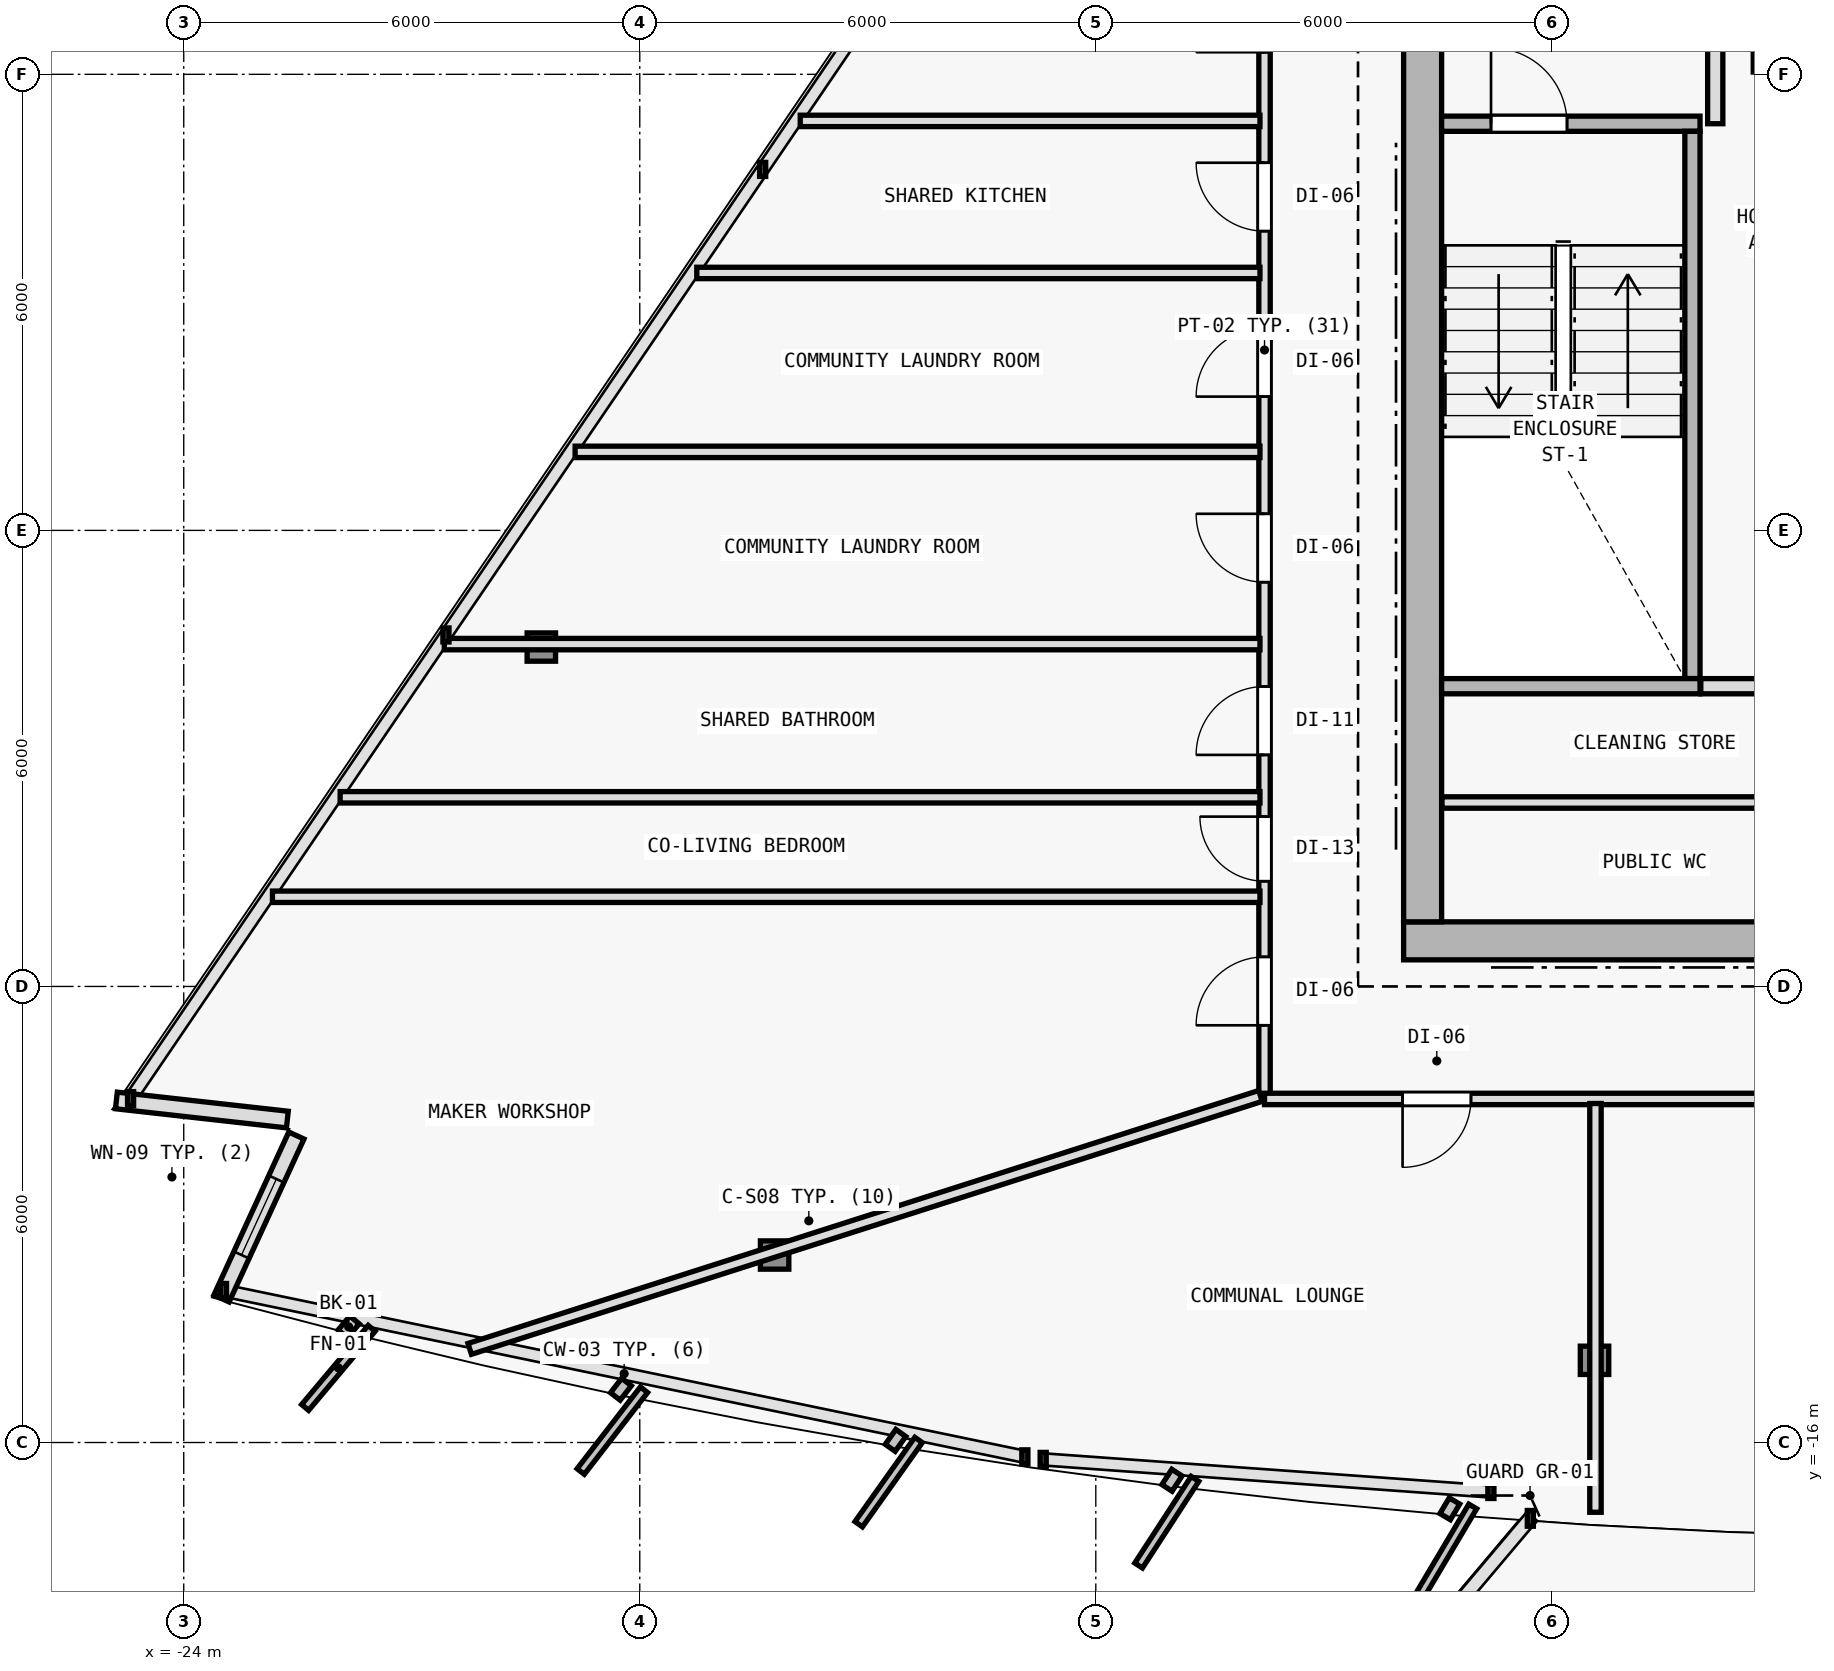
"""IFC4 building model, lengths in metres.
Left out: names, types, materials, properties, quantities, classifications, styles, units other than length and angle.
Written with IfcOpenShell. Run it as: python <this file> out.ifc"""

import sys

from ifc_helpers import new_model, si_unit, direction, frame, frame_2d, origin, origin_2d, place, context, subcontext, project, spatial, rectangle, i_section, extrude, element, fill, save


model = new_model("IFC4")
c1 = context("Model", 3, precision=1e-05, world=origin(), true_north=direction((0.0, 1.0)))
c2 = subcontext(c1, "Body", "Model", "MODEL_VIEW")
j1 = project(units=[si_unit("LENGTHUNIT", "METRE"), si_unit("PLANEANGLEUNIT", "RADIAN")], contexts=[c1])
p1 = place(None, origin())
s1 = spatial("IfcSite", under=j1, at=p1, CompositionType="ELEMENT")
p2 = place(p1, origin())
s2 = spatial("IfcBuilding", under=s1, at=p2, CompositionType="ELEMENT")
p3 = place(p2, frame((0.0, 0.0, 234.3)))
s3 = spatial("IfcBuildingStorey", under=s2, at=p3, CompositionType="ELEMENT", Elevation=234.3)
for number, where, z_axis, x_axis in (
    (1, (-7.7, -9.4, 0.0), (0.0, 0.0, 1.0), (1.0, 0.0, 0.0)),
    (2, (-7.7, 2.0, 0.0), (0.0, 0.0, 1.0), (1.0, 0.0, 0.0)),
):
    element("IfcColumn", number, at=place(p3, frame(where, z_axis=z_axis, x_axis=x_axis)), inside=s3, PredefinedType="COLUMN", context=c2, shape_type="SweptSolid", body=[
        extrude(i_section(OverallWidth=0.398, OverallDepth=0.387, WebThickness=0.013, FlangeThickness=0.022, FilletRadius=0.015, at=origin_2d()), origin(), (0.0, 0.0, 1.0), 3.6),
    ])
p4 = place(p3, frame((-16.226, -13.533, 0.005), z_axis=(0.020594893987, 0.033509183946, 0.999226193078), x_axis=(-0.851954850327, 0.523615252838, 0.0)))
e3 = element("IfcColumn", 3, at=p4, inside=s3, PredefinedType="COLUMN", context=c2, shape_type="SweptSolid", body=[
    extrude(i_section(OverallWidth=0.374, OverallDepth=0.372, WebThickness=0.012, FlangeThickness=0.02, FilletRadius=0.015, at=origin_2d()), origin(), (0.0, 0.0, 1.0), 3.592),
])
p5 = place(p3, frame((-5.438, -14.918, 0.005), z_axis=(0.006865841702, 0.035280909339, 0.999353850072), x_axis=(-0.981585848295, 0.191021523464, 0.0)))
e4 = element("IfcColumn", 4, at=p5, inside=s3, PredefinedType="COLUMN", context=c2, shape_type="SweptSolid", body=[
    extrude(i_section(OverallWidth=0.374, OverallDepth=0.372, WebThickness=0.012, FlangeThickness=0.02, FilletRadius=0.015, at=origin_2d()), origin(), (0.0, 0.0, 1.0), 3.592),
])
p6 = place(p3, frame((-19.295, -5.535, 0.005), z_axis=(0.025222449659, 0.021619242565, 0.999448065876), x_axis=(-0.650791373456, 0.759256602365, 0.0)))
e5 = element("IfcColumn", 5, at=p6, inside=s3, PredefinedType="COLUMN", context=c2, shape_type="SweptSolid", body=[
    extrude(i_section(OverallWidth=0.374, OverallDepth=0.372, WebThickness=0.012, FlangeThickness=0.02, FilletRadius=0.015, at=origin_2d()), origin(), (0.0, 0.0, 1.0), 3.591),
])
p7 = place(p3, frame((-22.637, -11.751, 0.0), z_axis=(0.0, 0.0, 1.0), x_axis=(-0.993821756753, 0.110987908368, 0.0)))
e6 = element("IfcWall", 6, at=p7, inside=s3, PredefinedType="SOLIDWALL", context=c2, shape_type="SweptSolid", body=[
    extrude(rectangle(XDim=2.263, YDim=0.22, at=frame_2d((1.132, 0.0))), origin(), (0.0, 0.0, 1.0), 3.35),
])
p8 = place(p3, frame((-23.503, -14.105, 0.0), z_axis=(0.0, 0.0, 1.0), x_axis=(0.417541737863, 0.908657744777, 0.0)))
e7 = element("IfcWall", 7, at=p8, inside=s3, PredefinedType="SOLIDWALL", context=c2, shape_type="SweptSolid", body=[
    extrude(rectangle(XDim=2.359, YDim=0.22, at=frame_2d((1.18, 0.0))), origin(), (0.0, 0.0, 1.0), 3.35),
])
p9 = place(p8, frame((0.63, 0.0, 0.62)))
e8 = element("IfcOpeningElement", 8, at=p9, cuts=e7, PredefinedType="OPENING", context=c2, shape_type="SweptSolid", body=[
    extrude(rectangle(XDim=1.1, YDim=1.8, at=frame_2d((0.55, 0.9))), frame((0.0, 0.12, 0.0), z_axis=(0.0, -1.0, 0.0), x_axis=(1.0, 0.0, 0.0)), (0.0, 0.0, 1.0), 0.24),
])
p10 = place(p3, frame((-7.95, -9.4, 0.0), z_axis=(0.0, 0.0, 1.0), x_axis=(1.0, 0.0, 0.0)))
e9 = element("IfcWall", 9, at=p10, inside=s3, PredefinedType="SHEAR", context=c2, shape_type="SweptSolid", body=[
    extrude(rectangle(XDim=15.9, YDim=0.5, at=frame_2d((7.95, 0.0))), origin(), (0.0, 0.0, 1.0), 3.35),
])
p11 = place(p10, frame((9.6, 0.0, 0.0)))
e10 = element("IfcOpeningElement", 10, at=p11, cuts=e9, PredefinedType="OPENING", context=c2, shape_type="SweptSolid", body=[
    extrude(rectangle(XDim=1.5, YDim=2.2, at=frame_2d((0.75, 1.1))), frame((0.0, 0.26, 0.0), z_axis=(0.0, -1.0, 0.0), x_axis=(1.0, 0.0, 0.0)), (0.0, 0.0, 1.0), 0.52),
])
p12 = place(p3, frame((-7.7, -9.15, 0.0), z_axis=(0.0, 0.0, 1.0), x_axis=(0.0, 1.0, 0.0)))
e11 = element("IfcWall", 11, at=p12, inside=s3, PredefinedType="SHEAR", context=c2, shape_type="SweptSolid", body=[
    extrude(rectangle(XDim=19.1, YDim=0.5, at=frame_2d((9.55, 0.0))), origin(), (0.0, 0.0, 1.0), 3.35),
])
p13 = place(p12, frame((12.7, 0.0, 0.0)))
e12 = element("IfcOpeningElement", 12, at=p13, cuts=e11, PredefinedType="OPENING", context=c2, shape_type="SweptSolid", body=[
    extrude(rectangle(XDim=1.1, YDim=2.15, at=frame_2d((0.55, 1.075))), frame((0.0, 0.26, 0.0), z_axis=(0.0, -1.0, 0.0), x_axis=(1.0, 0.0, 0.0)), (0.0, 0.0, 1.0), 0.52),
])
p14 = place(p3, frame((-7.45, 1.35, 0.0), z_axis=(0.0, 0.0, 1.0), x_axis=(1.0, 0.0, 0.0)))
e13 = element("IfcWall", 13, at=p14, inside=s3, PredefinedType="SOLIDWALL", context=c2, shape_type="SweptSolid", body=[
    extrude(rectangle(XDim=3.4, YDim=0.2, at=frame_2d((1.7, 0.0))), origin(), (0.0, 0.0, 1.0), 3.35),
])
p15 = place(p14, frame((0.65, 0.0, 0.0)))
e14 = element("IfcOpeningElement", 14, at=p15, cuts=e13, PredefinedType="OPENING", context=c2, shape_type="SweptSolid", body=[
    extrude(rectangle(XDim=1.0, YDim=2.15, at=frame_2d((0.5, 1.075))), frame((0.0, 0.11, 0.0), z_axis=(0.0, -1.0, 0.0), x_axis=(1.0, 0.0, 0.0)), (0.0, 0.0, 1.0), 0.22),
])
p16 = place(p3, frame((-4.15, -5.95, 0.0), z_axis=(0.0, 0.0, 1.0), x_axis=(0.0, 1.0, 0.0)))
e15 = element("IfcWall", 15, at=p16, inside=s3, PredefinedType="SOLIDWALL", context=c2, shape_type="SweptSolid", body=[
    extrude(rectangle(XDim=7.2, YDim=0.2, at=frame_2d((3.6, 0.0))), origin(), (0.0, 0.0, 1.0), 3.35),
])
p17 = place(p3, frame((-3.85, 1.35, 0.0), z_axis=(0.0, 0.0, 1.0), x_axis=(0.0, 1.0, 0.0)))
e16 = element("IfcWall", 16, at=p17, inside=s3, PredefinedType="SOLIDWALL", context=c2, shape_type="SweptSolid", body=[
    extrude(rectangle(XDim=8.595, YDim=0.2, at=frame_2d((4.297, 0.0))), origin(), (0.0, 0.0, 1.0), 3.35),
])
p18 = place(p17, frame((1.5, 0.0, 0.0)))
e17 = element("IfcOpeningElement", 17, at=p18, cuts=e16, PredefinedType="OPENING", context=c2, shape_type="SweptSolid", body=[
    extrude(rectangle(XDim=1.0, YDim=2.15, at=frame_2d((0.5, 1.075))), frame((0.0, 0.11, 0.0), z_axis=(0.0, -1.0, 0.0), x_axis=(1.0, 0.0, 0.0)), (0.0, 0.0, 1.0), 0.22),
])
p19 = place(p17, frame((3.18, 0.0, 0.0)))
e18 = element("IfcOpeningElement", 18, at=p19, cuts=e16, PredefinedType="OPENING", context=c2, shape_type="SweptSolid", body=[
    extrude(rectangle(XDim=1.0, YDim=2.15, at=frame_2d((0.5, 1.075))), frame((0.0, 0.11, 0.0), z_axis=(0.0, -1.0, 0.0), x_axis=(1.0, 0.0, 0.0)), (0.0, 0.0, 1.0), 0.22),
])
p20 = place(p3, frame((-7.45, -6.05, 0.0), z_axis=(0.0, 0.0, 1.0), x_axis=(1.0, 0.0, 0.0)))
e19 = element("IfcWall", 19, at=p20, inside=s3, PredefinedType="SOLIDWALL", context=c2, shape_type="SweptSolid", body=[
    extrude(rectangle(XDim=3.4, YDim=0.2, at=frame_2d((1.7, 0.0))), origin(), (0.0, 0.0, 1.0), 3.35),
])
p21 = place(p3, frame((-4.04, -6.05, 0.0), z_axis=(0.0, 0.0, 1.0), x_axis=(1.0, 0.0, 0.0)))
e20 = element("IfcWall", 20, at=p21, inside=s3, PredefinedType="SOLIDWALL", context=c2, shape_type="SweptSolid", body=[
    extrude(rectangle(XDim=2.79, YDim=0.2, at=frame_2d((1.395, 0.0))), origin(), (0.0, 0.0, 1.0), 3.35),
])
p22 = place(p3, frame((-7.445, -7.58, 0.0), z_axis=(0.0, 0.0, 1.0), x_axis=(1.0, 0.0, 0.0)))
e21 = element("IfcWall", 21, at=p22, inside=s3, PredefinedType="PARTITIONING", context=c2, shape_type="SweptSolid", body=[
    extrude(rectangle(XDim=6.195, YDim=0.15, at=frame_2d((3.098, 0.0))), origin(), (0.0, 0.0, 1.0), 3.35),
])
p23 = place(p3, frame((-9.78, -11.48, 0.0), z_axis=(0.0, 0.0, 1.0), x_axis=(0.0, 1.0, 0.0)))
e22 = element("IfcWall", 22, at=p23, inside=s3, PredefinedType="PARTITIONING", context=c2, shape_type="SweptSolid", body=[
    extrude(rectangle(XDim=19.706, YDim=0.15, at=frame_2d((9.853, 0.0))), origin(), (0.0, 0.0, 1.0), 2.775),
])
p24 = place(p23, frame((11.417, 0.0, 0.0)))
e23 = element("IfcOpeningElement", 23, at=p24, cuts=e22, PredefinedType="OPENING", context=c2, shape_type="SweptSolid", body=[
    extrude(rectangle(XDim=0.9, YDim=2.1, at=frame_2d((0.45, 1.05))), frame((0.0, 0.085, 0.0), z_axis=(0.0, -1.0, 0.0), x_axis=(1.0, 0.0, 0.0)), (0.0, 0.0, 1.0), 0.17),
])
p25 = place(p23, frame((9.24, 0.0, 0.0)))
e24 = element("IfcOpeningElement", 24, at=p25, cuts=e22, PredefinedType="OPENING", context=c2, shape_type="SweptSolid", body=[
    extrude(rectangle(XDim=0.9, YDim=2.1, at=frame_2d((0.45, 1.05))), frame((0.0, 0.085, 0.0), z_axis=(0.0, -1.0, 0.0), x_axis=(1.0, 0.0, 0.0)), (0.0, 0.0, 1.0), 0.17),
])
p26 = place(p23, frame((6.798, 0.0, 0.0)))
e25 = element("IfcOpeningElement", 25, at=p26, cuts=e22, PredefinedType="OPENING", context=c2, shape_type="SweptSolid", body=[
    extrude(rectangle(XDim=0.9, YDim=2.1, at=frame_2d((0.45, 1.05))), frame((0.0, 0.085, 0.0), z_axis=(0.0, -1.0, 0.0), x_axis=(1.0, 0.0, 0.0)), (0.0, 0.0, 1.0), 0.17),
])
p27 = place(p23, frame((4.526, 0.0, 0.0)))
e26 = element("IfcOpeningElement", 26, at=p27, cuts=e22, PredefinedType="OPENING", context=c2, shape_type="SweptSolid", body=[
    extrude(rectangle(XDim=0.9, YDim=2.1, at=frame_2d((0.45, 1.05))), frame((0.0, 0.085, 0.0), z_axis=(0.0, -1.0, 0.0), x_axis=(1.0, 0.0, 0.0)), (0.0, 0.0, 1.0), 0.17),
])
p28 = place(p23, frame((2.864, 0.0, 0.0)))
e27 = element("IfcOpeningElement", 27, at=p28, cuts=e22, PredefinedType="OPENING", context=c2, shape_type="SweptSolid", body=[
    extrude(rectangle(XDim=0.85, YDim=2.1, at=frame_2d((0.425, 1.05))), frame((0.0, 0.085, 0.0), z_axis=(0.0, -1.0, 0.0), x_axis=(1.0, 0.0, 0.0)), (0.0, 0.0, 1.0), 0.17),
])
p29 = place(p23, frame((0.969, 0.0, 0.0)))
e28 = element("IfcOpeningElement", 28, at=p29, cuts=e22, PredefinedType="OPENING", context=c2, shape_type="SweptSolid", body=[
    extrude(rectangle(XDim=0.9, YDim=2.1, at=frame_2d((0.45, 1.05))), frame((0.0, 0.085, 0.0), z_axis=(0.0, -1.0, 0.0), x_axis=(1.0, 0.0, 0.0)), (0.0, 0.0, 1.0), 0.17),
])
p30 = place(p23, frame((13.771, 0.0, 0.0)))
e29 = element("IfcOpeningElement", 29, at=p30, cuts=e22, PredefinedType="OPENING", context=c2, shape_type="SweptSolid", body=[
    extrude(rectangle(XDim=0.9, YDim=2.1, at=frame_2d((0.45, 1.05))), frame((0.0, 0.085, 0.0), z_axis=(0.0, -1.0, 0.0), x_axis=(1.0, 0.0, 0.0)), (0.0, 0.0, 1.0), 0.17),
])
p31 = place(p3, frame((9.78, -11.48, 0.0), z_axis=(0.0, 0.0, 1.0), x_axis=(-1.0, 0.0, 0.0)))
e30 = element("IfcWall", 30, at=p31, inside=s3, PredefinedType="PARTITIONING", context=c2, shape_type="SweptSolid", body=[
    extrude(rectangle(XDim=19.56, YDim=0.15, at=frame_2d((9.78, 0.0))), origin(), (0.0, 0.0, 1.0), 3.005),
])
p32 = place(p31, frame((16.844, 0.0, 0.0)))
e31 = element("IfcOpeningElement", 31, at=p32, cuts=e30, PredefinedType="OPENING", context=c2, shape_type="SweptSolid", body=[
    extrude(rectangle(XDim=0.9, YDim=2.1, at=frame_2d((0.45, 1.05))), frame((0.0, 0.085, 0.0), z_axis=(0.0, -1.0, 0.0), x_axis=(1.0, 0.0, 0.0)), (0.0, 0.0, 1.0), 0.17),
])
p33 = place(p3, frame((-9.834, -11.441, 0.0), z_axis=(0.0, 0.0, 1.0), x_axis=(-0.952464105683, -0.304650828631, 0.0)))
e32 = element("IfcWall", 32, at=p33, inside=s3, PredefinedType="PARTITIONING", context=c2, shape_type="SweptSolid", body=[
    extrude(rectangle(XDim=10.923, YDim=0.15, at=frame_2d((5.461, 0.0))), origin(), (0.0, 0.0, 1.0), 2.725),
])
p34 = place(p3, frame((-5.426, -11.54, 0.0), z_axis=(0.0, 0.0, 1.0), x_axis=(0.0, -1.0, 0.0)))
e33 = element("IfcWall", 33, at=p34, inside=s3, PredefinedType="PARTITIONING", context=c2, shape_type="SweptSolid", body=[
    extrude(rectangle(XDim=5.378, YDim=0.15, at=frame_2d((2.689, 0.0))), origin(), (0.0, 0.0, 1.0), 2.725),
])
p35 = place(p3, frame((-9.84, -5.496, 0.0), z_axis=(0.0, 0.0, 1.0), x_axis=(-1.0, 0.0, 0.0)))
e34 = element("IfcWall", 34, at=p35, inside=s3, PredefinedType="PARTITIONING", context=c2, shape_type="SweptSolid", body=[
    extrude(rectangle(XDim=10.731, YDim=0.15, at=frame_2d((5.366, 0.0))), origin(), (0.0, 0.0, 1.0), 2.725),
])
p36 = place(p3, frame((-9.84, -0.613, 0.0), z_axis=(0.0, 0.0, 1.0), x_axis=(-1.0, 0.0, 0.0)))
e35 = element("IfcWall", 35, at=p36, inside=s3, PredefinedType="PARTITIONING", context=c2, shape_type="SweptSolid", body=[
    extrude(rectangle(XDim=7.41, YDim=0.15, at=frame_2d((3.705, 0.0))), origin(), (0.0, 0.0, 1.0), 2.725),
])
p37 = place(p3, frame((-9.84, -8.82, 0.0), z_axis=(0.0, 0.0, 1.0), x_axis=(-1.0, 0.0, 0.0)))
e36 = element("IfcWall", 36, at=p37, inside=s3, PredefinedType="PARTITIONING", context=c2, shape_type="SweptSolid", body=[
    extrude(rectangle(XDim=12.993, YDim=0.15, at=frame_2d((6.496, 0.0))), origin(), (0.0, 0.0, 1.0), 2.875),
])
p38 = place(p3, frame((-9.84, -2.967, 0.0), z_axis=(0.0, 0.0, 1.0), x_axis=(-1.0, 0.0, 0.0)))
e37 = element("IfcWall", 37, at=p38, inside=s3, PredefinedType="PARTITIONING", context=c2, shape_type="SweptSolid", body=[
    extrude(rectangle(XDim=9.011, YDim=0.15, at=frame_2d((4.505, 0.0))), origin(), (0.0, 0.0, 1.0), 2.725),
])
p39 = place(p3, frame((-9.84, -7.511, 0.0), z_axis=(0.0, 0.0, 1.0), x_axis=(-1.0, 0.0, 0.0)))
e38 = element("IfcWall", 38, at=p39, inside=s3, PredefinedType="PARTITIONING", context=c2, shape_type="SweptSolid", body=[
    extrude(rectangle(XDim=12.102, YDim=0.15, at=frame_2d((6.051, 0.0))), origin(), (0.0, 0.0, 1.0), 2.775),
])
p40 = place(p3, frame((-9.84, 1.387, 0.0), z_axis=(0.0, 0.0, 1.0), x_axis=(-1.0, 0.0, 0.0)))
e39 = element("IfcWall", 39, at=p40, inside=s3, PredefinedType="PARTITIONING", context=c2, shape_type="SweptSolid", body=[
    extrude(rectangle(XDim=6.049, YDim=0.15, at=frame_2d((3.024, 0.0))), origin(), (0.0, 0.0, 1.0), 2.725),
])
p41 = place(p9, origin())
e40 = element("IfcWindow", 40, at=p41, inside=s3, PartitioningType="SINGLE_PANEL", PredefinedType="WINDOW", context=c2, shape_type="SweptSolid", body=[
    extrude(rectangle(XDim=1.1, YDim=1.8, at=frame_2d((0.55, 0.9))), frame((0.0, 0.03, 0.0), z_axis=(0.0, -1.0, 0.0), x_axis=(1.0, 0.0, 0.0)), (0.0, 0.0, 1.0), 0.06),
])
fill(e8, e40)
p42 = place(p15, origin())
e41 = element("IfcDoor", 41, at=p42, inside=s3, OperationType="SINGLE_SWING_LEFT", PredefinedType="DOOR", context=c2, shape_type="SweptSolid", body=[
    extrude(rectangle(XDim=1.0, YDim=2.15, at=frame_2d((0.5, 1.075))), frame((0.0, 0.025, 0.0), z_axis=(0.0, -1.0, 0.0), x_axis=(1.0, 0.0, 0.0)), (0.0, 0.0, 1.0), 0.05),
])
fill(e14, e41)
p43 = place(p24, origin())
e42 = element("IfcDoor", 42, at=p43, inside=s3, OperationType="SINGLE_SWING_RIGHT", PredefinedType="DOOR", context=c2, shape_type="SweptSolid", body=[
    extrude(rectangle(XDim=0.9, YDim=2.1, at=frame_2d((0.45, 1.05))), frame((0.0, 0.025, 0.0), z_axis=(0.0, -1.0, 0.0), x_axis=(1.0, 0.0, 0.0)), (0.0, 0.0, 1.0), 0.05),
])
fill(e23, e42)
p44 = place(p25, origin())
e43 = element("IfcDoor", 43, at=p44, inside=s3, OperationType="SINGLE_SWING_LEFT", PredefinedType="DOOR", context=c2, shape_type="SweptSolid", body=[
    extrude(rectangle(XDim=0.9, YDim=2.1, at=frame_2d((0.45, 1.05))), frame((0.0, 0.025, 0.0), z_axis=(0.0, -1.0, 0.0), x_axis=(1.0, 0.0, 0.0)), (0.0, 0.0, 1.0), 0.05),
])
fill(e24, e43)
p45 = place(p26, origin())
e44 = element("IfcDoor", 44, at=p45, inside=s3, OperationType="SINGLE_SWING_RIGHT", PredefinedType="DOOR", context=c2, shape_type="SweptSolid", body=[
    extrude(rectangle(XDim=0.9, YDim=2.1, at=frame_2d((0.45, 1.05))), frame((0.0, 0.025, 0.0), z_axis=(0.0, -1.0, 0.0), x_axis=(1.0, 0.0, 0.0)), (0.0, 0.0, 1.0), 0.05),
])
fill(e25, e44)
p46 = place(p27, origin())
e45 = element("IfcDoor", 45, at=p46, inside=s3, OperationType="SINGLE_SWING_LEFT", PredefinedType="DOOR", context=c2, shape_type="SweptSolid", body=[
    extrude(rectangle(XDim=0.9, YDim=2.1, at=frame_2d((0.45, 1.05))), frame((0.0, 0.025, 0.0), z_axis=(0.0, -1.0, 0.0), x_axis=(1.0, 0.0, 0.0)), (0.0, 0.0, 1.0), 0.05),
])
fill(e26, e45)
p47 = place(p28, origin())
e46 = element("IfcDoor", 46, at=p47, inside=s3, OperationType="SINGLE_SWING_RIGHT", PredefinedType="DOOR", context=c2, shape_type="SweptSolid", body=[
    extrude(rectangle(XDim=0.85, YDim=2.1, at=frame_2d((0.425, 1.05))), frame((0.0, 0.025, 0.0), z_axis=(0.0, -1.0, 0.0), x_axis=(1.0, 0.0, 0.0)), (0.0, 0.0, 1.0), 0.05),
])
fill(e27, e46)
p48 = place(p29, origin())
e47 = element("IfcDoor", 47, at=p48, inside=s3, OperationType="SINGLE_SWING_LEFT", PredefinedType="DOOR", context=c2, shape_type="SweptSolid", body=[
    extrude(rectangle(XDim=0.9, YDim=2.1, at=frame_2d((0.45, 1.05))), frame((0.0, 0.025, 0.0), z_axis=(0.0, -1.0, 0.0), x_axis=(1.0, 0.0, 0.0)), (0.0, 0.0, 1.0), 0.05),
])
fill(e28, e47)
p49 = place(p32, origin())
e48 = element("IfcDoor", 48, at=p49, inside=s3, OperationType="SINGLE_SWING_RIGHT", PredefinedType="DOOR", context=c2, shape_type="SweptSolid", body=[
    extrude(rectangle(XDim=0.9, YDim=2.1, at=frame_2d((0.45, 1.05))), frame((0.0, 0.025, 0.0), z_axis=(0.0, -1.0, 0.0), x_axis=(1.0, 0.0, 0.0)), (0.0, 0.0, 1.0), 0.05),
])
fill(e31, e48)
p50 = place(p30, origin())
e49 = element("IfcDoor", 49, at=p50, inside=s3, OperationType="SINGLE_SWING_LEFT", PredefinedType="DOOR", context=c2, shape_type="SweptSolid", body=[
    extrude(rectangle(XDim=0.9, YDim=2.1, at=frame_2d((0.45, 1.05))), frame((0.0, 0.025, 0.0), z_axis=(0.0, -1.0, 0.0), x_axis=(1.0, 0.0, 0.0)), (0.0, 0.0, 1.0), 0.05),
])
fill(e29, e49)
save(model, sys.argv[1])
